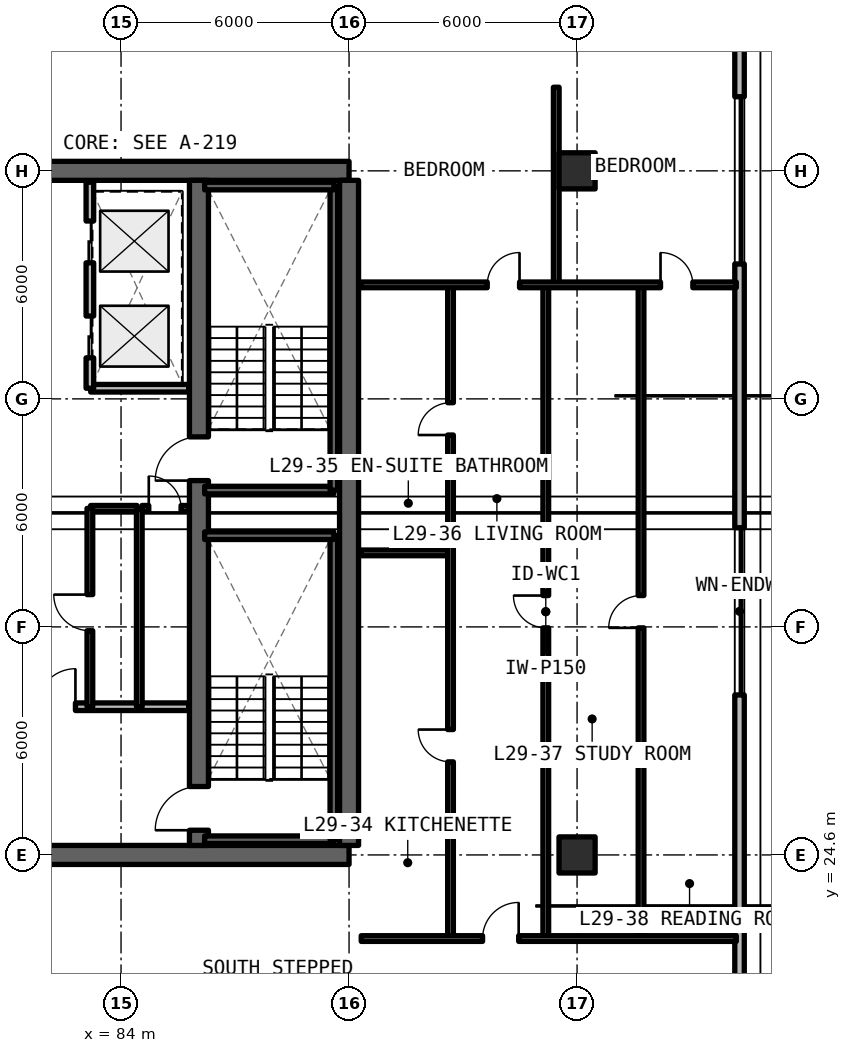
"""IFC4 building model, lengths in metres.
Left out: names, types, materials, properties, quantities, classifications, styles, units other than length and angle.
Written with IfcOpenShell. Run it as: python <this file> out.ifc"""

import sys

from ifc_helpers import new_model, si_unit, direction, frame, frame_2d, origin, origin_2d, place, context, subcontext, project, spatial, rectangle, extrude, element, fill, save


model = new_model("IFC4")
c1 = context("Model", 3, precision=1e-05, world=origin(), true_north=direction((0.0, 1.0)))
c2 = subcontext(c1, "Body", "Model", "MODEL_VIEW")
j1 = project(units=[si_unit("LENGTHUNIT", "METRE"), si_unit("PLANEANGLEUNIT", "RADIAN")], contexts=[c1])
p1 = place(None, origin())
s1 = spatial("IfcSite", under=j1, at=p1, CompositionType="ELEMENT")
p2 = place(p1, origin())
s2 = spatial("IfcBuilding", under=s1, at=p2, CompositionType="ELEMENT")
p3 = place(p2, frame((0.0, 0.0, 105.27)))
s3 = spatial("IfcBuildingStorey", under=s2, at=p3, CompositionType="ELEMENT", Elevation=105.27)
for number, where, z_axis, x_axis in (
    (1, (78.0, 24.6, 0.0), (0.0, 0.0, 1.0), (1.0, 0.0, 0.0)),
    (2, (90.0, 42.6, 0.0), (0.0, 0.0, 1.0), (-1.0, 0.0, 0.0)),
):
    element("IfcWall", number, at=place(p3, frame(where, z_axis=z_axis, x_axis=x_axis)), inside=s3, PredefinedType="SHEAR", context=c2, shape_type="SweptSolid", body=[
        extrude(rectangle(XDim=12.0, YDim=0.5, at=frame_2d((6.0, 0.0))), origin(), (0.0, 0.0, 1.0), 3.3),
    ])
p4 = place(p3, frame((90.0, 24.85, 0.0), z_axis=(0.0, 0.0, 1.0), x_axis=(0.0, 1.0, 0.0)))
e3 = element("IfcWall", 3, at=p4, inside=s3, PredefinedType="SHEAR", context=c2, shape_type="SweptSolid", body=[
    extrude(rectangle(XDim=17.5, YDim=0.5, at=frame_2d((8.75, 0.0))), origin(), (0.0, 0.0, 1.0), 3.3),
])
p5 = place(p3, frame((86.05, 24.85, 0.0), z_axis=(0.0, 0.0, 1.0), x_axis=(0.0, 1.0, 0.0)))
e4 = element("IfcWall", 4, at=p5, inside=s3, PredefinedType="SHEAR", context=c2, shape_type="SweptSolid", body=[
    extrude(rectangle(XDim=17.5, YDim=0.5, at=frame_2d((8.75, 0.0))), origin(), (0.0, 0.0, 1.0), 3.3),
])
p6 = place(p5, frame((0.4, 0.0, 0.0)))
e5 = element("IfcOpeningElement", 5, at=p6, cuts=e4, PredefinedType="OPENING", context=c2, shape_type="SweptSolid", body=[
    extrude(rectangle(XDim=1.15, YDim=2.15, at=frame_2d((0.575, 1.075))), frame((0.0, 0.26, 0.0), z_axis=(0.0, -1.0, 0.0), x_axis=(1.0, 0.0, 0.0)), (0.0, 0.0, 1.0), 0.52),
])
p7 = place(p5, frame((9.6, 0.0, 0.0)))
e6 = element("IfcOpeningElement", 6, at=p7, cuts=e4, PredefinedType="OPENING", context=c2, shape_type="SweptSolid", body=[
    extrude(rectangle(XDim=1.15, YDim=2.15, at=frame_2d((0.575, 1.075))), frame((0.0, 0.26, 0.0), z_axis=(0.0, -1.0, 0.0), x_axis=(1.0, 0.0, 0.0)), (0.0, 0.0, 1.0), 0.52),
])
for number, where, z_axis, x_axis in (
    (7, (96.0, 24.6, 0.0), (0.0, 0.0, 1.0), (1.0, 0.0, 0.0)),
    (8, (96.0, 42.6, 0.0), (0.0, 0.0, 1.0), (1.0, 0.0, 0.0)),
):
    element("IfcColumn", number, at=place(p3, frame(where, z_axis=z_axis, x_axis=x_axis)), inside=s3, PredefinedType="COLUMN", context=c2, shape_type="SweptSolid", body=[
        extrude(rectangle(XDim=0.95, YDim=0.95, at=origin_2d()), origin(), (0.0, 0.0, 1.0), 3.3),
    ])
p8 = place(p3, frame((100.275, 13.852, 0.0), z_axis=(0.0, 0.0, 1.0), x_axis=(0.0, 1.0, 0.0)))
e9 = element("IfcWall", 9, at=p8, inside=s3, PredefinedType="SOLIDWALL", context=c2, shape_type="SweptSolid", body=[
    extrude(rectangle(XDim=39.496, YDim=0.25, at=frame_2d((19.748, 0.0))), origin(), (0.0, 0.0, 1.0), 3.08),
])
p9 = place(p8, frame((14.958, 0.0, 0.78)))
e10 = element("IfcOpeningElement", 10, at=p9, cuts=e9, PredefinedType="OPENING", context=c2, shape_type="SweptSolid", body=[
    extrude(rectangle(XDim=4.4, YDim=1.66, at=frame_2d((2.2, 0.83))), frame((0.0, 0.135, 0.0), z_axis=(0.0, -1.0, 0.0), x_axis=(1.0, 0.0, 0.0)), (0.0, 0.0, 1.0), 0.27),
])
p10 = place(p8, frame((26.298, 0.0, 0.78)))
e11 = element("IfcOpeningElement", 11, at=p10, cuts=e9, PredefinedType="OPENING", context=c2, shape_type="SweptSolid", body=[
    extrude(rectangle(XDim=4.4, YDim=1.66, at=frame_2d((2.2, 0.83))), frame((0.0, 0.135, 0.0), z_axis=(0.0, -1.0, 0.0), x_axis=(1.0, 0.0, 0.0)), (0.0, 0.0, 1.0), 0.27),
])
p11 = place(p8, frame((2.454, 0.0, 0.78)))
e12 = element("IfcOpeningElement", 12, at=p11, cuts=e9, PredefinedType="OPENING", context=c2, shape_type="SweptSolid", body=[
    extrude(rectangle(XDim=1.4, YDim=1.65, at=frame_2d((0.7, 0.825))), frame((0.0, 0.135, 0.0), z_axis=(0.0, -1.0, 0.0), x_axis=(1.0, 0.0, 0.0)), (0.0, 0.0, 1.0), 0.27),
])
p12 = place(p3, frame((78.27, 28.5, 0.0), z_axis=(0.0, 0.0, 1.0), x_axis=(1.0, 0.0, 0.0)))
e13 = element("IfcWall", 13, at=p12, inside=s3, PredefinedType="SOLIDWALL", context=c2, shape_type="SweptSolid", body=[
    extrude(rectangle(XDim=7.51, YDim=0.2, at=frame_2d((3.755, 0.0))), origin(), (0.0, 0.0, 1.0), 2.35),
])
p13 = place(p12, frame((3.53, 0.0, 0.0)))
e14 = element("IfcOpeningElement", 14, at=p13, cuts=e13, PredefinedType="OPENING", context=c2, shape_type="SweptSolid", body=[
    extrude(rectangle(XDim=1.0, YDim=2.15, at=frame_2d((0.5, 1.075))), frame((0.0, 0.11, 0.0), z_axis=(0.0, -1.0, 0.0), x_axis=(1.0, 0.0, 0.0)), (0.0, 0.0, 1.0), 0.22),
])
p14 = place(p3, frame((84.48, 28.5, 0.0), z_axis=(0.0, 0.0, 1.0), x_axis=(0.0, 1.0, 0.0)))
e15 = element("IfcWall", 15, at=p14, inside=s3, PredefinedType="SOLIDWALL", context=c2, shape_type="SweptSolid", body=[
    extrude(rectangle(XDim=5.22, YDim=0.15, at=frame_2d((2.61, 0.0))), origin(), (0.0, 0.0, 1.0), 2.35),
])
p15 = place(p3, frame((84.55, 33.72, 0.0), z_axis=(0.0, 0.0, 1.0), x_axis=(1.0, 0.0, 0.0)))
e16 = element("IfcWall", 16, at=p15, inside=s3, PredefinedType="SOLIDWALL", context=c2, shape_type="SweptSolid", body=[
    extrude(rectangle(XDim=1.23, YDim=0.15, at=frame_2d((0.615, 0.0))), origin(), (0.0, 0.0, 1.0), 2.35),
])
p16 = place(p15, frame((0.18, 0.0, 0.0)))
e17 = element("IfcOpeningElement", 17, at=p16, cuts=e16, PredefinedType="OPENING", context=c2, shape_type="SweptSolid", body=[
    extrude(rectangle(XDim=0.85, YDim=2.1, at=frame_2d((0.425, 1.05))), frame((0.0, 0.085, 0.0), z_axis=(0.0, -1.0, 0.0), x_axis=(1.0, 0.0, 0.0)), (0.0, 0.0, 1.0), 0.17),
])
p17 = place(p3, frame((83.2, 33.72, 0.0), z_axis=(0.0, 0.0, 1.0), x_axis=(1.0, 0.0, 0.0)))
e18 = element("IfcWall", 18, at=p17, inside=s3, PredefinedType="SOLIDWALL", context=c2, shape_type="SweptSolid", body=[
    extrude(rectangle(XDim=1.22, YDim=0.15, at=frame_2d((0.61, 0.0))), origin(), (0.0, 0.0, 1.0), 2.35),
])
p18 = place(p3, frame((83.18, 28.5, 0.0), z_axis=(0.0, 0.0, 1.0), x_axis=(0.0, 1.0, 0.0)))
e19 = element("IfcWall", 19, at=p18, inside=s3, PredefinedType="SOLIDWALL", context=c2, shape_type="SweptSolid", body=[
    extrude(rectangle(XDim=5.22, YDim=0.15, at=frame_2d((2.61, 0.0))), origin(), (0.0, 0.0, 1.0), 2.35),
])
p19 = place(p18, frame((2.0, 0.0, 0.0)))
e20 = element("IfcOpeningElement", 20, at=p19, cuts=e19, PredefinedType="OPENING", context=c2, shape_type="SweptSolid", body=[
    extrude(rectangle(XDim=0.95, YDim=2.15, at=frame_2d((0.475, 1.075))), frame((0.0, 0.085, 0.0), z_axis=(0.0, -1.0, 0.0), x_axis=(1.0, 0.0, 0.0)), (0.0, 0.0, 1.0), 0.17),
])
p20 = place(p3, frame((83.2, 36.88, 0.0), z_axis=(0.0, 0.0, 1.0), x_axis=(1.0, 0.0, 0.0)))
e21 = element("IfcWall", 21, at=p20, inside=s3, PredefinedType="SOLIDWALL", context=c2, shape_type="SweptSolid", body=[
    extrude(rectangle(XDim=2.58, YDim=0.2, at=frame_2d((1.29, 0.0))), origin(), (0.0, 0.0, 1.0), 2.35),
])
p21 = place(p3, frame((83.18, 36.88, 0.0), z_axis=(0.0, 0.0, 1.0), x_axis=(0.0, 1.0, 0.0)))
e22 = element("IfcWall", 22, at=p21, inside=s3, PredefinedType="SOLIDWALL", context=c2, shape_type="SweptSolid", body=[
    extrude(rectangle(XDim=5.42, YDim=0.2, at=frame_2d((2.71, 0.0))), origin(), (0.0, 0.0, 1.0), 2.35),
])
p22 = place(p21, frame((0.8, 0.0, 0.0)))
e23 = element("IfcOpeningElement", 23, at=p22, cuts=e22, PredefinedType="OPENING", context=c2, shape_type="SweptSolid", body=[
    extrude(rectangle(XDim=1.1, YDim=2.2, at=frame_2d((0.55, 1.1))), frame((0.0, 0.11, 0.0), z_axis=(0.0, -1.0, 0.0), x_axis=(1.0, 0.0, 0.0)), (0.0, 0.0, 1.0), 0.22),
])
p23 = place(p21, frame((3.3, 0.0, 0.0)))
e24 = element("IfcOpeningElement", 24, at=p23, cuts=e22, PredefinedType="OPENING", context=c2, shape_type="SweptSolid", body=[
    extrude(rectangle(XDim=1.1, YDim=2.2, at=frame_2d((0.55, 1.1))), frame((0.0, 0.11, 0.0), z_axis=(0.0, -1.0, 0.0), x_axis=(1.0, 0.0, 0.0)), (0.0, 0.0, 1.0), 0.22),
])
p24 = place(p3, frame((95.177, 22.4, 0.0), z_axis=(0.0, 0.0, 1.0), x_axis=(0.0, 1.0, 0.0)))
e25 = element("IfcWall", 25, at=p24, inside=s3, PredefinedType="PARTITIONING", context=c2, shape_type="SweptSolid", body=[
    extrude(rectangle(XDim=17.2, YDim=0.15, at=frame_2d((8.6, 0.0))), origin(), (0.0, 0.0, 1.0), 2.35),
])
p25 = place(p24, frame((8.175, 0.0, 0.0)))
e26 = element("IfcOpeningElement", 26, at=p25, cuts=e25, PredefinedType="OPENING", context=c2, shape_type="SweptSolid", body=[
    extrude(rectangle(XDim=0.85, YDim=2.1, at=frame_2d((0.425, 1.05))), frame((0.0, 0.085, 0.0), z_axis=(0.0, -1.0, 0.0), x_axis=(1.0, 0.0, 0.0)), (0.0, 0.0, 1.0), 0.17),
])
p26 = place(p3, frame((97.683, 22.4, 0.0), z_axis=(0.0, 0.0, 1.0), x_axis=(0.0, 1.0, 0.0)))
e27 = element("IfcWall", 27, at=p26, inside=s3, PredefinedType="PARTITIONING", context=c2, shape_type="SweptSolid", body=[
    extrude(rectangle(XDim=17.2, YDim=0.15, at=frame_2d((8.6, 0.0))), origin(), (0.0, 0.0, 1.0), 2.35),
])
p27 = place(p26, frame((8.175, 0.0, 0.0)))
e28 = element("IfcOpeningElement", 28, at=p27, cuts=e27, PredefinedType="OPENING", context=c2, shape_type="SweptSolid", body=[
    extrude(rectangle(XDim=0.85, YDim=2.1, at=frame_2d((0.425, 1.05))), frame((0.0, 0.085, 0.0), z_axis=(0.0, -1.0, 0.0), x_axis=(1.0, 0.0, 0.0)), (0.0, 0.0, 1.0), 0.17),
])
p28 = place(p3, frame((90.32, 32.548, 0.0), z_axis=(0.0, 0.0, 1.0), x_axis=(1.0, 0.0, 0.0)))
e29 = element("IfcWall", 29, at=p28, inside=s3, PredefinedType="PARTITIONING", context=c2, shape_type="SweptSolid", body=[
    extrude(rectangle(XDim=2.35, YDim=0.15, at=frame_2d((1.175, 0.0))), origin(), (0.0, 0.0, 1.0), 2.35),
])
p29 = place(p3, frame((92.67, 22.4, 0.0), z_axis=(0.0, 0.0, 1.0), x_axis=(0.0, 1.0, 0.0)))
e30 = element("IfcWall", 30, at=p29, inside=s3, PredefinedType="PARTITIONING", context=c2, shape_type="SweptSolid", body=[
    extrude(rectangle(XDim=17.2, YDim=0.15, at=frame_2d((8.6, 0.0))), origin(), (0.0, 0.0, 1.0), 2.35),
])
p30 = place(p29, frame((4.649, 0.0, 0.0)))
e31 = element("IfcOpeningElement", 31, at=p30, cuts=e30, PredefinedType="OPENING", context=c2, shape_type="SweptSolid", body=[
    extrude(rectangle(XDim=0.85, YDim=2.1, at=frame_2d((0.425, 1.05))), frame((0.0, 0.085, 0.0), z_axis=(0.0, -1.0, 0.0), x_axis=(1.0, 0.0, 0.0)), (0.0, 0.0, 1.0), 0.17),
])
p31 = place(p29, frame((13.249, 0.0, 0.0)))
e32 = element("IfcOpeningElement", 32, at=p31, cuts=e30, PredefinedType="OPENING", context=c2, shape_type="SweptSolid", body=[
    extrude(rectangle(XDim=0.85, YDim=2.1, at=frame_2d((0.425, 1.05))), frame((0.0, 0.085, 0.0), z_axis=(0.0, -1.0, 0.0), x_axis=(1.0, 0.0, 0.0)), (0.0, 0.0, 1.0), 0.17),
])
p32 = place(p3, frame((95.452, 39.6, 0.0), z_axis=(0.0, 0.0, 1.0), x_axis=(0.0, 1.0, 0.0)))
e33 = element("IfcWall", 33, at=p32, inside=s3, PredefinedType="PARTITIONING", context=c2, shape_type="SweptSolid", body=[
    extrude(rectangle(XDim=5.2, YDim=0.15, at=frame_2d((2.6, 0.0))), origin(), (0.0, 0.0, 1.0), 2.35),
])
p33 = place(p3, frame((90.32, 39.6, 0.0), z_axis=(0.0, 0.0, 1.0), x_axis=(1.0, 0.0, 0.0)))
e34 = element("IfcWall", 34, at=p33, inside=s3, PredefinedType="PARTITIONING", context=c2, shape_type="SweptSolid", body=[
    extrude(rectangle(XDim=9.87, YDim=0.15, at=frame_2d((4.935, 0.0))), origin(), (0.0, 0.0, 1.0), 2.35),
])
p34 = place(p33, frame((3.316, 0.0, 0.0)))
e35 = element("IfcOpeningElement", 35, at=p34, cuts=e34, PredefinedType="OPENING", context=c2, shape_type="SweptSolid", body=[
    extrude(rectangle(XDim=0.85, YDim=2.1, at=frame_2d((0.425, 1.05))), frame((0.0, 0.085, 0.0), z_axis=(0.0, -1.0, 0.0), x_axis=(1.0, 0.0, 0.0)), (0.0, 0.0, 1.0), 0.17),
])
p35 = place(p33, frame((7.876, 0.0, 0.0)))
e36 = element("IfcOpeningElement", 36, at=p35, cuts=e34, PredefinedType="OPENING", context=c2, shape_type="SweptSolid", body=[
    extrude(rectangle(XDim=0.85, YDim=2.1, at=frame_2d((0.425, 1.05))), frame((0.0, 0.085, 0.0), z_axis=(0.0, -1.0, 0.0), x_axis=(1.0, 0.0, 0.0)), (0.0, 0.0, 1.0), 0.17),
])
p36 = place(p3, frame((90.32, 22.4, 0.0), z_axis=(0.0, 0.0, 1.0), x_axis=(1.0, 0.0, 0.0)))
e37 = element("IfcWall", 37, at=p36, inside=s3, PredefinedType="SOLIDWALL", context=c2, shape_type="SweptSolid", body=[
    extrude(rectangle(XDim=9.87, YDim=0.15, at=frame_2d((4.935, 0.0))), origin(), (0.0, 0.0, 1.0), 2.35),
])
p37 = place(p36, frame((3.193, 0.0, 0.0)))
e38 = element("IfcOpeningElement", 38, at=p37, cuts=e37, PredefinedType="OPENING", context=c2, shape_type="SweptSolid", body=[
    extrude(rectangle(XDim=0.95, YDim=2.15, at=frame_2d((0.475, 1.075))), frame((0.0, 0.085, 0.0), z_axis=(0.0, -1.0, 0.0), x_axis=(1.0, 0.0, 0.0)), (0.0, 0.0, 1.0), 0.17),
])
p38 = place(p3, frame((86.2, 25.0, 0.0), z_axis=(0.0, 0.0, 1.0), x_axis=(1.0, 0.0, 0.0)))
e39 = element("IfcWall", 39, at=p38, inside=s3, PredefinedType="SOLIDWALL", context=c2, shape_type="SweptSolid", body=[
    extrude(rectangle(XDim=3.4, YDim=0.2, at=frame_2d((1.7, 0.0))), origin(), (0.0, 0.0, 1.0), 3.3),
])
p39 = place(p3, frame((89.6, 25.0, 0.0), z_axis=(0.0, 0.0, 1.0), x_axis=(0.0, 1.0, 0.0)))
e40 = element("IfcWall", 40, at=p39, inside=s3, PredefinedType="SOLIDWALL", context=c2, shape_type="SweptSolid", body=[
    extrude(rectangle(XDim=8.0, YDim=0.2, at=frame_2d((4.0, 0.0))), origin(), (0.0, 0.0, 1.0), 3.3),
])
for number, where, z_axis, x_axis in (
    (41, (89.6, 33.0, 0.0), (0.0, 0.0, 1.0), (-1.0, 0.0, 0.0)),
    (42, (86.2, 34.2, 0.0), (0.0, 0.0, 1.0), (1.0, 0.0, 0.0)),
):
    element("IfcWall", number, at=place(p3, frame(where, z_axis=z_axis, x_axis=x_axis)), inside=s3, PredefinedType="SOLIDWALL", context=c2, shape_type="SweptSolid", body=[
        extrude(rectangle(XDim=3.4, YDim=0.2, at=frame_2d((1.7, 0.0))), origin(), (0.0, 0.0, 1.0), 3.3),
    ])
p40 = place(p3, frame((89.6, 34.2, 0.0), z_axis=(0.0, 0.0, 1.0), x_axis=(0.0, 1.0, 0.0)))
e43 = element("IfcWall", 43, at=p40, inside=s3, PredefinedType="SOLIDWALL", context=c2, shape_type="SweptSolid", body=[
    extrude(rectangle(XDim=8.0, YDim=0.2, at=frame_2d((4.0, 0.0))), origin(), (0.0, 0.0, 1.0), 3.3),
])
p41 = place(p3, frame((89.6, 42.2, 0.0), z_axis=(0.0, 0.0, 1.0), x_axis=(-1.0, 0.0, 0.0)))
e44 = element("IfcWall", 44, at=p41, inside=s3, PredefinedType="SOLIDWALL", context=c2, shape_type="SweptSolid", body=[
    extrude(rectangle(XDim=3.4, YDim=0.2, at=frame_2d((1.7, 0.0))), origin(), (0.0, 0.0, 1.0), 3.3),
])
p42 = place(p9, origin())
e45 = element("IfcWindow", 45, at=p42, inside=s3, PartitioningType="SINGLE_PANEL", PredefinedType="WINDOW", context=c2, shape_type="SweptSolid", body=[
    extrude(rectangle(XDim=4.4, YDim=1.66, at=frame_2d((2.2, 0.83))), frame((0.0, 0.03, 0.0), z_axis=(0.0, -1.0, 0.0), x_axis=(1.0, 0.0, 0.0)), (0.0, 0.0, 1.0), 0.06),
])
fill(e10, e45)
p43 = place(p10, origin())
e46 = element("IfcWindow", 46, at=p43, inside=s3, PartitioningType="SINGLE_PANEL", PredefinedType="WINDOW", context=c2, shape_type="SweptSolid", body=[
    extrude(rectangle(XDim=4.4, YDim=1.66, at=frame_2d((2.2, 0.83))), frame((0.0, 0.03, 0.0), z_axis=(0.0, -1.0, 0.0), x_axis=(1.0, 0.0, 0.0)), (0.0, 0.0, 1.0), 0.06),
])
fill(e11, e46)
p44 = place(p13, origin())
e47 = element("IfcDoor", 47, at=p44, inside=s3, OperationType="SINGLE_SWING_RIGHT", PredefinedType="DOOR", context=c2, shape_type="SweptSolid", body=[
    extrude(rectangle(XDim=1.0, YDim=2.15, at=frame_2d((0.5, 1.075))), frame((0.0, 0.025, 0.0), z_axis=(0.0, -1.0, 0.0), x_axis=(1.0, 0.0, 0.0)), (0.0, 0.0, 1.0), 0.05),
])
fill(e14, e47)
p45 = place(p16, origin())
e48 = element("IfcDoor", 48, at=p45, inside=s3, OperationType="SINGLE_SWING_LEFT", PredefinedType="DOOR", context=c2, shape_type="SweptSolid", body=[
    extrude(rectangle(XDim=0.85, YDim=2.1, at=frame_2d((0.425, 1.05))), frame((0.0, 0.025, 0.0), z_axis=(0.0, -1.0, 0.0), x_axis=(1.0, 0.0, 0.0)), (0.0, 0.0, 1.0), 0.05),
])
fill(e17, e48)
p46 = place(p19, origin())
e49 = element("IfcDoor", 49, at=p46, inside=s3, OperationType="SINGLE_SWING_RIGHT", PredefinedType="DOOR", context=c2, shape_type="SweptSolid", body=[
    extrude(rectangle(XDim=0.95, YDim=2.15, at=frame_2d((0.475, 1.075))), frame((0.0, 0.025, 0.0), z_axis=(0.0, -1.0, 0.0), x_axis=(1.0, 0.0, 0.0)), (0.0, 0.0, 1.0), 0.05),
])
fill(e20, e49)
p47 = place(p22, origin())
e50 = element("IfcDoor", 50, at=p47, inside=s3, OperationType="SLIDING_TO_LEFT", PredefinedType="DOOR", context=c2, shape_type="SweptSolid", body=[
    extrude(rectangle(XDim=1.1, YDim=2.2, at=frame_2d((0.55, 1.1))), frame((0.0, 0.025, 0.0), z_axis=(0.0, -1.0, 0.0), x_axis=(1.0, 0.0, 0.0)), (0.0, 0.0, 1.0), 0.05),
])
fill(e23, e50)
p48 = place(p23, origin())
e51 = element("IfcDoor", 51, at=p48, inside=s3, OperationType="SLIDING_TO_RIGHT", PredefinedType="DOOR", context=c2, shape_type="SweptSolid", body=[
    extrude(rectangle(XDim=1.1, YDim=2.2, at=frame_2d((0.55, 1.1))), frame((0.0, 0.025, 0.0), z_axis=(0.0, -1.0, 0.0), x_axis=(1.0, 0.0, 0.0)), (0.0, 0.0, 1.0), 0.05),
])
fill(e24, e51)
p49 = place(p25, origin())
e52 = element("IfcDoor", 52, at=p49, inside=s3, OperationType="SINGLE_SWING_RIGHT", PredefinedType="DOOR", context=c2, shape_type="SweptSolid", body=[
    extrude(rectangle(XDim=0.85, YDim=2.1, at=frame_2d((0.425, 1.05))), frame((0.0, 0.025, 0.0), z_axis=(0.0, -1.0, 0.0), x_axis=(1.0, 0.0, 0.0)), (0.0, 0.0, 1.0), 0.05),
])
fill(e26, e52)
p50 = place(p27, origin())
e53 = element("IfcDoor", 53, at=p50, inside=s3, OperationType="SINGLE_SWING_LEFT", PredefinedType="DOOR", context=c2, shape_type="SweptSolid", body=[
    extrude(rectangle(XDim=0.85, YDim=2.1, at=frame_2d((0.425, 1.05))), frame((0.0, 0.025, 0.0), z_axis=(0.0, -1.0, 0.0), x_axis=(1.0, 0.0, 0.0)), (0.0, 0.0, 1.0), 0.05),
])
fill(e28, e53)
p51 = place(p30, origin())
e54 = element("IfcDoor", 54, at=p51, inside=s3, OperationType="SINGLE_SWING_RIGHT", PredefinedType="DOOR", context=c2, shape_type="SweptSolid", body=[
    extrude(rectangle(XDim=0.85, YDim=2.1, at=frame_2d((0.425, 1.05))), frame((0.0, 0.025, 0.0), z_axis=(0.0, -1.0, 0.0), x_axis=(1.0, 0.0, 0.0)), (0.0, 0.0, 1.0), 0.05),
])
fill(e31, e54)
p52 = place(p31, origin())
e55 = element("IfcDoor", 55, at=p52, inside=s3, OperationType="SINGLE_SWING_LEFT", PredefinedType="DOOR", context=c2, shape_type="SweptSolid", body=[
    extrude(rectangle(XDim=0.85, YDim=2.1, at=frame_2d((0.425, 1.05))), frame((0.0, 0.025, 0.0), z_axis=(0.0, -1.0, 0.0), x_axis=(1.0, 0.0, 0.0)), (0.0, 0.0, 1.0), 0.05),
])
fill(e32, e55)
p53 = place(p34, origin())
e56 = element("IfcDoor", 56, at=p53, inside=s3, OperationType="SINGLE_SWING_RIGHT", PredefinedType="DOOR", context=c2, shape_type="SweptSolid", body=[
    extrude(rectangle(XDim=0.85, YDim=2.1, at=frame_2d((0.425, 1.05))), frame((0.0, 0.025, 0.0), z_axis=(0.0, -1.0, 0.0), x_axis=(1.0, 0.0, 0.0)), (0.0, 0.0, 1.0), 0.05),
])
fill(e35, e56)
p54 = place(p35, origin())
e57 = element("IfcDoor", 57, at=p54, inside=s3, OperationType="SINGLE_SWING_LEFT", PredefinedType="DOOR", context=c2, shape_type="SweptSolid", body=[
    extrude(rectangle(XDim=0.85, YDim=2.1, at=frame_2d((0.425, 1.05))), frame((0.0, 0.025, 0.0), z_axis=(0.0, -1.0, 0.0), x_axis=(1.0, 0.0, 0.0)), (0.0, 0.0, 1.0), 0.05),
])
fill(e36, e57)
p55 = place(p37, origin())
e58 = element("IfcDoor", 58, at=p55, inside=s3, OperationType="SINGLE_SWING_RIGHT", PredefinedType="DOOR", context=c2, shape_type="SweptSolid", body=[
    extrude(rectangle(XDim=0.95, YDim=2.15, at=frame_2d((0.475, 1.075))), frame((0.0, 0.025, 0.0), z_axis=(0.0, -1.0, 0.0), x_axis=(1.0, 0.0, 0.0)), (0.0, 0.0, 1.0), 0.05),
])
fill(e38, e58)
p56 = place(p6, origin())
e59 = element("IfcDoor", 59, at=p56, inside=s3, OperationType="SINGLE_SWING_RIGHT", PredefinedType="DOOR", context=c2, shape_type="SweptSolid", body=[
    extrude(rectangle(XDim=1.15, YDim=2.15, at=frame_2d((0.575, 1.075))), frame((0.0, 0.025, 0.0), z_axis=(0.0, -1.0, 0.0), x_axis=(1.0, 0.0, 0.0)), (0.0, 0.0, 1.0), 0.05),
])
fill(e5, e59)
p57 = place(p7, origin())
e60 = element("IfcDoor", 60, at=p57, inside=s3, OperationType="SINGLE_SWING_LEFT", PredefinedType="DOOR", context=c2, shape_type="SweptSolid", body=[
    extrude(rectangle(XDim=1.15, YDim=2.15, at=frame_2d((0.575, 1.075))), frame((0.0, 0.025, 0.0), z_axis=(0.0, -1.0, 0.0), x_axis=(1.0, 0.0, 0.0)), (0.0, 0.0, 1.0), 0.05),
])
fill(e6, e60)
save(model, sys.argv[1])
